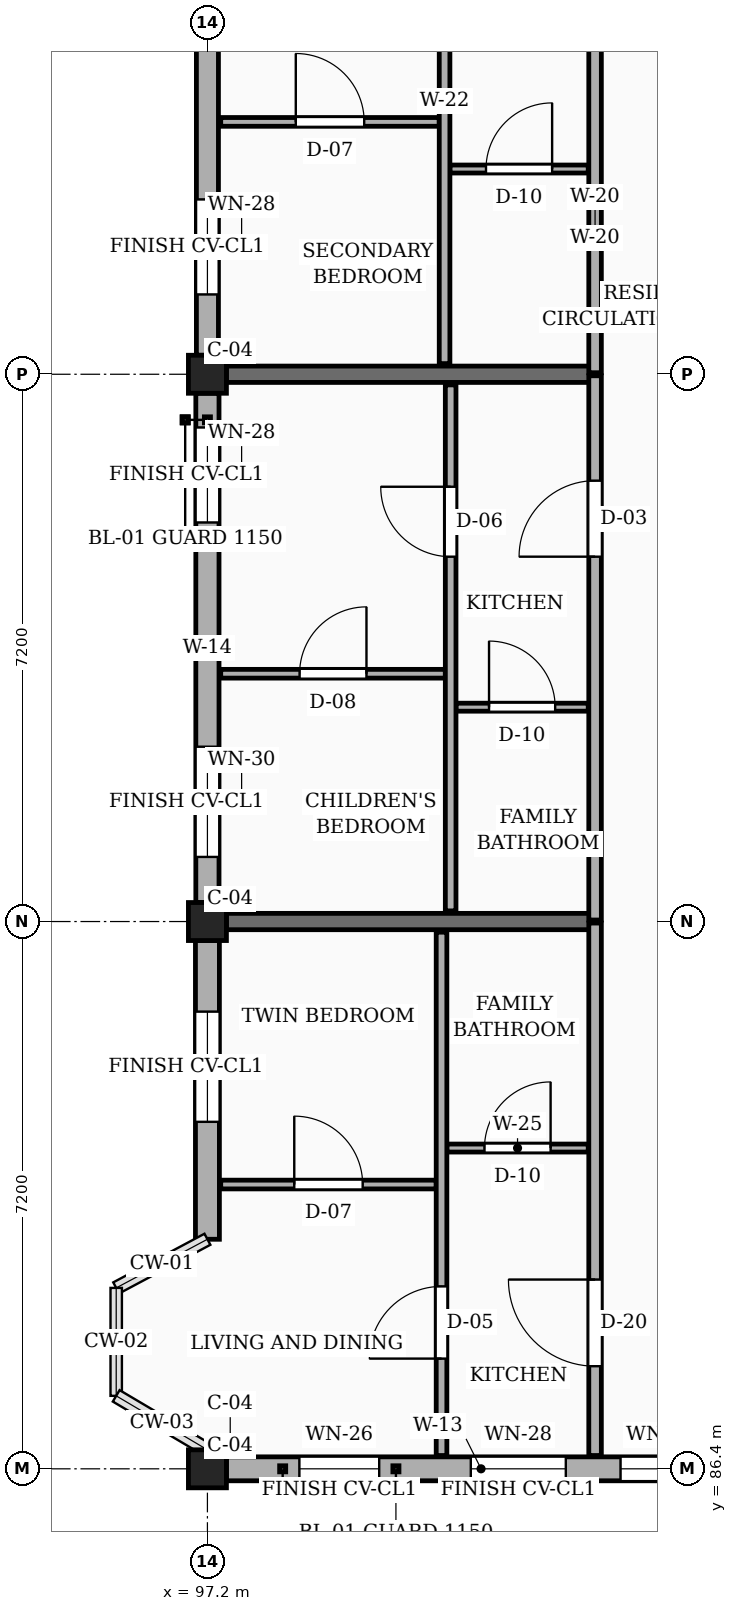
"""IFC4 building model, lengths in metres.
Left out: names, types, materials, properties, quantities, classifications, styles, units other than length and angle.
Written with IfcOpenShell. Run it as: python <this file> out.ifc"""

import sys

from ifc_helpers import new_model, si_unit, direction, frame, frame_2d, origin, origin_2d, place, context, subcontext, project, spatial, rectangle, extrude, element, fill, save


model = new_model("IFC4")
c1 = context("Model", 3, precision=1e-05, world=origin(), true_north=direction((0.0, 1.0)))
c2 = subcontext(c1, "Body", "Model", "MODEL_VIEW")
j1 = project(units=[si_unit("LENGTHUNIT", "METRE"), si_unit("PLANEANGLEUNIT", "RADIAN")], contexts=[c1])
p1 = place(None, origin())
s1 = spatial("IfcSite", under=j1, at=p1, CompositionType="ELEMENT")
p2 = place(p1, origin())
s2 = spatial("IfcBuilding", under=s1, at=p2, CompositionType="ELEMENT")
p3 = place(p2, frame((0.0, 0.0, 26.55)))
s3 = spatial("IfcBuildingStorey", under=s2, at=p3, CompositionType="ELEMENT", Elevation=26.55)
for number, where, z_axis, x_axis in (
    (1, (97.2, 86.4, 0.0), (0.0, 0.0, 1.0), (1.0, 0.0, 0.0)),
    (2, (97.2, 93.6, 0.0), (0.0, 0.0, 1.0), (1.0, 0.0, 0.0)),
    (3, (97.2, 100.8, 0.0), (0.0, 0.0, 1.0), (1.0, 0.0, 0.0)),
):
    element("IfcColumn", number, at=place(p3, frame(where, z_axis=z_axis, x_axis=x_axis)), inside=s3, PredefinedType="COLUMN", context=c2, shape_type="SweptSolid", body=[
        extrude(rectangle(XDim=0.5, YDim=0.5, at=origin_2d()), origin(), (0.0, 0.0, 1.0), 3.15),
    ])
for number, where, z_axis, x_axis in (
    (4, (97.45, 93.6, 0.0), (0.0, 0.0, 1.0), (1.0, 0.0, 0.0)),
    (5, (97.45, 100.8, 0.0), (0.0, 0.0, 1.0), (1.0, 0.0, 0.0)),
):
    element("IfcWall", number, at=place(p3, frame(where, z_axis=z_axis, x_axis=x_axis)), inside=s3, PredefinedType="SOLIDWALL", context=c2, shape_type="SweptSolid", body=[
        extrude(rectangle(XDim=4.85, YDim=0.215, at=frame_2d((2.425, 0.0))), origin(), (0.0, 0.0, 1.0), 2.19),
    ])
p4 = place(p3, frame((97.45, 86.4, 0.0), z_axis=(0.0, 0.0, 1.0), x_axis=(1.0, 0.0, 0.0)))
e6 = element("IfcWall", 6, at=p4, inside=s3, PredefinedType="SOLIDWALL", context=c2, shape_type="SweptSolid", body=[
    extrude(rectangle(XDim=6.7, YDim=0.315, at=frame_2d((3.35, 0.0))), origin(), (0.0, 0.0, 1.0), 2.46),
])
p5 = place(p4, frame((0.96, 0.0, 0.78)))
e7 = element("IfcOpeningElement", 7, at=p5, cuts=e6, PredefinedType="OPENING", context=c2, shape_type="SweptSolid", body=[
    extrude(rectangle(XDim=1.05, YDim=1.44, at=frame_2d((0.525, 0.72))), frame((0.0, 0.167, 0.0), z_axis=(0.0, -1.0, 0.0), x_axis=(1.0, 0.0, 0.0)), (0.0, 0.0, 1.0), 0.335),
])
p6 = place(p4, frame((3.215, 0.0, 0.78)))
e8 = element("IfcOpeningElement", 8, at=p6, cuts=e6, PredefinedType="OPENING", context=c2, shape_type="SweptSolid", body=[
    extrude(rectangle(XDim=1.25, YDim=1.44, at=frame_2d((0.625, 0.72))), frame((0.0, 0.167, 0.0), z_axis=(0.0, -1.0, 0.0), x_axis=(1.0, 0.0, 0.0)), (0.0, 0.0, 1.0), 0.335),
])
p7 = place(p4, frame((5.185, 0.0, 0.78)))
e9 = element("IfcOpeningElement", 9, at=p7, cuts=e6, PredefinedType="OPENING", context=c2, shape_type="SweptSolid", body=[
    extrude(rectangle(XDim=1.04, YDim=1.26, at=frame_2d((0.52, 0.63))), frame((0.0, 0.167, 0.0), z_axis=(0.0, -1.0, 0.0), x_axis=(1.0, 0.0, 0.0)), (0.0, 0.0, 1.0), 0.335),
])
p8 = place(p3, frame((97.2, 107.75, 0.0), z_axis=(0.0, 0.0, 1.0), x_axis=(0.0, -1.0, 0.0)))
e10 = element("IfcWall", 10, at=p8, inside=s3, PredefinedType="SOLIDWALL", context=c2, shape_type="SweptSolid", body=[
    extrude(rectangle(XDim=6.7, YDim=0.29, at=frame_2d((3.35, 0.0))), origin(), (0.0, 0.0, 1.0), 2.46),
])
p9 = place(p8, frame((0.45, 0.0, 0.78)))
e11 = element("IfcOpeningElement", 11, at=p9, cuts=e10, PredefinedType="OPENING", context=c2, shape_type="SweptSolid", body=[
    extrude(rectangle(XDim=1.05, YDim=1.44, at=frame_2d((0.525, 0.72))), frame((0.0, 0.155, 0.0), z_axis=(0.0, -1.0, 0.0), x_axis=(1.0, 0.0, 0.0)), (0.0, 0.0, 1.0), 0.31),
])
p10 = place(p8, frame((4.65, 0.0, 0.78)))
e12 = element("IfcOpeningElement", 12, at=p10, cuts=e10, PredefinedType="OPENING", context=c2, shape_type="SweptSolid", body=[
    extrude(rectangle(XDim=1.25, YDim=1.44, at=frame_2d((0.625, 0.72))), frame((0.0, 0.155, 0.0), z_axis=(0.0, -1.0, 0.0), x_axis=(1.0, 0.0, 0.0)), (0.0, 0.0, 1.0), 0.31),
])
p11 = place(p3, frame((97.2, 100.55, 0.0), z_axis=(0.0, 0.0, 1.0), x_axis=(0.0, -1.0, 0.0)))
e13 = element("IfcWall", 13, at=p11, inside=s3, PredefinedType="SOLIDWALL", context=c2, shape_type="SweptSolid", body=[
    extrude(rectangle(XDim=6.7, YDim=0.305, at=frame_2d((3.35, 0.0))), origin(), (0.0, 0.0, 1.0), 2.46),
])
p12 = place(p11, frame((0.45, 0.0, 0.78)))
e14 = element("IfcOpeningElement", 14, at=p12, cuts=e13, PredefinedType="OPENING", context=c2, shape_type="SweptSolid", body=[
    extrude(rectangle(XDim=1.25, YDim=1.44, at=frame_2d((0.625, 0.72))), frame((0.0, 0.163, 0.0), z_axis=(0.0, -1.0, 0.0), x_axis=(1.0, 0.0, 0.0)), (0.0, 0.0, 1.0), 0.325),
])
p13 = place(p11, frame((4.65, 0.0, 0.78)))
e15 = element("IfcOpeningElement", 15, at=p13, cuts=e13, PredefinedType="OPENING", context=c2, shape_type="SweptSolid", body=[
    extrude(rectangle(XDim=1.45, YDim=1.44, at=frame_2d((0.725, 0.72))), frame((0.0, 0.163, 0.0), z_axis=(0.0, -1.0, 0.0), x_axis=(1.0, 0.0, 0.0)), (0.0, 0.0, 1.0), 0.325),
])
p14 = place(p3, frame((97.2, 93.35, 0.0), z_axis=(0.0, 0.0, 1.0), x_axis=(0.0, -1.0, 0.0)))
e16 = element("IfcWall", 16, at=p14, inside=s3, PredefinedType="SOLIDWALL", context=c2, shape_type="SweptSolid", body=[
    extrude(rectangle(XDim=3.93, YDim=0.315, at=frame_2d((1.965, 0.0))), origin(), (0.0, 0.0, 1.0), 2.46),
])
p15 = place(p14, frame((0.935, 0.0, 0.78)))
e17 = element("IfcOpeningElement", 17, at=p15, cuts=e16, PredefinedType="OPENING", context=c2, shape_type="SweptSolid", body=[
    extrude(rectangle(XDim=1.45, YDim=1.44, at=frame_2d((0.725, 0.72))), frame((0.0, 0.167, 0.0), z_axis=(0.0, -1.0, 0.0), x_axis=(1.0, 0.0, 0.0)), (0.0, 0.0, 1.0), 0.335),
])
p16 = place(p3, frame((102.3, 86.575, 0.0), z_axis=(0.0, 0.0, 1.0), x_axis=(0.0, 1.0, 0.0)))
e18 = element("IfcWall", 18, at=p16, inside=s3, PredefinedType="PARTITIONING", context=c2, shape_type="SweptSolid", body=[
    extrude(rectangle(XDim=7.005, YDim=0.165, at=frame_2d((3.502, 0.0))), origin(), (0.0, 0.0, 1.0), 2.325),
])
p17 = place(p16, frame((1.175, 0.0, 0.0)))
e19 = element("IfcOpeningElement", 19, at=p17, cuts=e18, PredefinedType="OPENING", context=c2, shape_type="SweptSolid", body=[
    extrude(rectangle(XDim=1.14, YDim=2.18, at=frame_2d((0.57, 1.09))), frame((0.0, 0.093, 0.0), z_axis=(0.0, -1.0, 0.0), x_axis=(1.0, 0.0, 0.0)), (0.0, 0.0, 1.0), 0.185),
])
p18 = place(p3, frame((102.3, 93.62, 0.0), z_axis=(0.0, 0.0, 1.0), x_axis=(0.0, 1.0, 0.0)))
e20 = element("IfcWall", 20, at=p18, inside=s3, PredefinedType="PARTITIONING", context=c2, shape_type="SweptSolid", body=[
    extrude(rectangle(XDim=7.16, YDim=0.165, at=frame_2d((3.58, 0.0))), origin(), (0.0, 0.0, 1.0), 2.325),
])
p19 = place(p18, frame((4.78, 0.0, 0.0)))
e21 = element("IfcOpeningElement", 21, at=p19, cuts=e20, PredefinedType="OPENING", context=c2, shape_type="SweptSolid", body=[
    extrude(rectangle(XDim=1.0, YDim=2.15, at=frame_2d((0.5, 1.075))), frame((0.0, 0.093, 0.0), z_axis=(0.0, -1.0, 0.0), x_axis=(1.0, 0.0, 0.0)), (0.0, 0.0, 1.0), 0.185),
])
p20 = place(p3, frame((102.3, 100.82, 0.0), z_axis=(0.0, 0.0, 1.0), x_axis=(0.0, 1.0, 0.0)))
e22 = element("IfcWall", 22, at=p20, inside=s3, PredefinedType="PARTITIONING", context=c2, shape_type="SweptSolid", body=[
    extrude(rectangle(XDim=7.16, YDim=0.165, at=frame_2d((3.58, 0.0))), origin(), (0.0, 0.0, 1.0), 2.325),
])
p21 = place(p20, frame((4.78, 0.0, 0.0)))
e23 = element("IfcOpeningElement", 23, at=p21, cuts=e22, PredefinedType="OPENING", context=c2, shape_type="SweptSolid", body=[
    extrude(rectangle(XDim=0.94, YDim=2.12, at=frame_2d((0.47, 1.06))), frame((0.0, 0.093, 0.0), z_axis=(0.0, -1.0, 0.0), x_axis=(1.0, 0.0, 0.0)), (0.0, 0.0, 1.0), 0.185),
])
p22 = place(p3, frame((97.375, 90.14, 0.0), z_axis=(0.0, 0.0, 1.0), x_axis=(1.0, 0.0, 0.0)))
e24 = element("IfcWall", 24, at=p22, inside=s3, PredefinedType="PARTITIONING", context=c2, shape_type="SweptSolid", body=[
    extrude(rectangle(XDim=2.835, YDim=0.115, at=frame_2d((1.417, 0.0))), origin(), (0.0, 0.0, 1.0), 2.325),
])
p23 = place(p22, frame((0.968, 0.0, 0.0)))
e25 = element("IfcOpeningElement", 25, at=p23, cuts=e24, PredefinedType="OPENING", context=c2, shape_type="SweptSolid", body=[
    extrude(rectangle(XDim=0.9, YDim=2.1, at=frame_2d((0.45, 1.05))), frame((0.0, 0.067, 0.0), z_axis=(0.0, -1.0, 0.0), x_axis=(1.0, 0.0, 0.0)), (0.0, 0.0, 1.0), 0.135),
])
p24 = place(p3, frame((100.35, 90.62, 0.0), z_axis=(0.0, 0.0, 1.0), x_axis=(1.0, 0.0, 0.0)))
e26 = element("IfcWall", 26, at=p24, inside=s3, PredefinedType="PARTITIONING", context=c2, shape_type="SweptSolid", body=[
    extrude(rectangle(XDim=1.86, YDim=0.105, at=frame_2d((0.93, 0.0))), origin(), (0.0, 0.0, 1.0), 2.325),
])
p25 = place(p24, frame((0.495, 0.0, 0.0)))
e27 = element("IfcOpeningElement", 27, at=p25, cuts=e26, PredefinedType="OPENING", context=c2, shape_type="SweptSolid", body=[
    extrude(rectangle(XDim=0.87, YDim=2.05, at=frame_2d((0.435, 1.025))), frame((0.0, 0.062, 0.0), z_axis=(0.0, -1.0, 0.0), x_axis=(1.0, 0.0, 0.0)), (0.0, 0.0, 1.0), 0.125),
])
p26 = place(p3, frame((100.28, 86.575, 0.0), z_axis=(0.0, 0.0, 1.0), x_axis=(0.0, 1.0, 0.0)))
e28 = element("IfcWall", 28, at=p26, inside=s3, PredefinedType="PARTITIONING", context=c2, shape_type="SweptSolid", body=[
    extrude(rectangle(XDim=6.885, YDim=0.14, at=frame_2d((3.442, 0.0))), origin(), (0.0, 0.0, 1.0), 2.325),
])
p27 = place(p26, frame((1.275, 0.0, 0.0)))
e29 = element("IfcOpeningElement", 29, at=p27, cuts=e28, PredefinedType="OPENING", context=c2, shape_type="SweptSolid", body=[
    extrude(rectangle(XDim=0.95, YDim=2.1, at=frame_2d((0.475, 1.05))), frame((0.0, 0.08, 0.0), z_axis=(0.0, -1.0, 0.0), x_axis=(1.0, 0.0, 0.0)), (0.0, 0.0, 1.0), 0.16),
])
p28 = place(p3, frame((97.375, 96.86, 0.0), z_axis=(0.0, 0.0, 1.0), x_axis=(1.0, 0.0, 0.0)))
e30 = element("IfcWall", 30, at=p28, inside=s3, PredefinedType="PARTITIONING", context=c2, shape_type="SweptSolid", body=[
    extrude(rectangle(XDim=2.955, YDim=0.115, at=frame_2d((1.478, 0.0))), origin(), (0.0, 0.0, 1.0), 2.325),
])
p29 = place(p28, frame((1.038, 0.0, 0.0)))
e31 = element("IfcOpeningElement", 31, at=p29, cuts=e30, PredefinedType="OPENING", context=c2, shape_type="SweptSolid", body=[
    extrude(rectangle(XDim=0.88, YDim=2.08, at=frame_2d((0.44, 1.04))), frame((0.0, 0.067, 0.0), z_axis=(0.0, -1.0, 0.0), x_axis=(1.0, 0.0, 0.0)), (0.0, 0.0, 1.0), 0.135),
])
p30 = place(p3, frame((100.47, 96.42, 0.0), z_axis=(0.0, 0.0, 1.0), x_axis=(1.0, 0.0, 0.0)))
e32 = element("IfcWall", 32, at=p30, inside=s3, PredefinedType="PARTITIONING", context=c2, shape_type="SweptSolid", body=[
    extrude(rectangle(XDim=1.74, YDim=0.105, at=frame_2d((0.87, 0.0))), origin(), (0.0, 0.0, 1.0), 2.325),
])
p31 = place(p30, frame((0.435, 0.0, 0.0)))
e33 = element("IfcOpeningElement", 33, at=p31, cuts=e32, PredefinedType="OPENING", context=c2, shape_type="SweptSolid", body=[
    extrude(rectangle(XDim=0.87, YDim=2.05, at=frame_2d((0.435, 1.025))), frame((0.0, 0.062, 0.0), z_axis=(0.0, -1.0, 0.0), x_axis=(1.0, 0.0, 0.0)), (0.0, 0.0, 1.0), 0.125),
])
p32 = place(p3, frame((100.4, 93.74, 0.0), z_axis=(0.0, 0.0, 1.0), x_axis=(0.0, 1.0, 0.0)))
e34 = element("IfcWall", 34, at=p32, inside=s3, PredefinedType="PARTITIONING", context=c2, shape_type="SweptSolid", body=[
    extrude(rectangle(XDim=6.92, YDim=0.14, at=frame_2d((3.46, 0.0))), origin(), (0.0, 0.0, 1.0), 2.325),
])
p33 = place(p32, frame((4.66, 0.0, 0.0)))
e35 = element("IfcOpeningElement", 35, at=p33, cuts=e34, PredefinedType="OPENING", context=c2, shape_type="SweptSolid", body=[
    extrude(rectangle(XDim=0.92, YDim=2.1, at=frame_2d((0.46, 1.05))), frame((0.0, 0.08, 0.0), z_axis=(0.0, -1.0, 0.0), x_axis=(1.0, 0.0, 0.0)), (0.0, 0.0, 1.0), 0.16),
])
p34 = place(p3, frame((97.375, 104.12, 0.0), z_axis=(0.0, 0.0, 1.0), x_axis=(1.0, 0.0, 0.0)))
e36 = element("IfcWall", 36, at=p34, inside=s3, PredefinedType="PARTITIONING", context=c2, shape_type="SweptSolid", body=[
    extrude(rectangle(XDim=2.875, YDim=0.115, at=frame_2d((1.438, 0.0))), origin(), (0.0, 0.0, 1.0), 2.325),
])
p35 = place(p34, frame((0.988, 0.0, 0.0)))
e37 = element("IfcOpeningElement", 37, at=p35, cuts=e36, PredefinedType="OPENING", context=c2, shape_type="SweptSolid", body=[
    extrude(rectangle(XDim=0.9, YDim=2.1, at=frame_2d((0.45, 1.05))), frame((0.0, 0.067, 0.0), z_axis=(0.0, -1.0, 0.0), x_axis=(1.0, 0.0, 0.0)), (0.0, 0.0, 1.0), 0.135),
])
p36 = place(p3, frame((100.39, 103.5, 0.0), z_axis=(0.0, 0.0, 1.0), x_axis=(1.0, 0.0, 0.0)))
e38 = element("IfcWall", 38, at=p36, inside=s3, PredefinedType="PARTITIONING", context=c2, shape_type="SweptSolid", body=[
    extrude(rectangle(XDim=1.82, YDim=0.105, at=frame_2d((0.91, 0.0))), origin(), (0.0, 0.0, 1.0), 2.325),
])
p37 = place(p36, frame((0.475, 0.0, 0.0)))
e39 = element("IfcOpeningElement", 39, at=p37, cuts=e38, PredefinedType="OPENING", context=c2, shape_type="SweptSolid", body=[
    extrude(rectangle(XDim=0.87, YDim=2.05, at=frame_2d((0.435, 1.025))), frame((0.0, 0.062, 0.0), z_axis=(0.0, -1.0, 0.0), x_axis=(1.0, 0.0, 0.0)), (0.0, 0.0, 1.0), 0.125),
])
p38 = place(p3, frame((100.32, 100.94, 0.0), z_axis=(0.0, 0.0, 1.0), x_axis=(0.0, 1.0, 0.0)))
e40 = element("IfcWall", 40, at=p38, inside=s3, PredefinedType="PARTITIONING", context=c2, shape_type="SweptSolid", body=[
    extrude(rectangle(XDim=6.92, YDim=0.14, at=frame_2d((3.46, 0.0))), origin(), (0.0, 0.0, 1.0), 2.325),
])
p39 = place(p38, frame((4.66, 0.0, 0.0)))
e41 = element("IfcOpeningElement", 41, at=p39, cuts=e40, PredefinedType="OPENING", context=c2, shape_type="SweptSolid", body=[
    extrude(rectangle(XDim=0.95, YDim=2.1, at=frame_2d((0.475, 1.05))), frame((0.0, 0.08, 0.0), z_axis=(0.0, -1.0, 0.0), x_axis=(1.0, 0.0, 0.0)), (0.0, 0.0, 1.0), 0.16),
])
p40 = place(p5, origin())
e42 = element("IfcWindow", 42, at=p40, inside=s3, PartitioningType="SINGLE_PANEL", PredefinedType="WINDOW", context=c2, shape_type="SweptSolid", body=[
    extrude(rectangle(XDim=1.05, YDim=1.44, at=frame_2d((0.525, 0.72))), frame((0.0, 0.03, 0.0), z_axis=(0.0, -1.0, 0.0), x_axis=(1.0, 0.0, 0.0)), (0.0, 0.0, 1.0), 0.06),
])
fill(e7, e42)
p41 = place(p6, origin())
e43 = element("IfcWindow", 43, at=p41, inside=s3, PartitioningType="SINGLE_PANEL", PredefinedType="WINDOW", context=c2, shape_type="SweptSolid", body=[
    extrude(rectangle(XDim=1.25, YDim=1.44, at=frame_2d((0.625, 0.72))), frame((0.0, 0.03, 0.0), z_axis=(0.0, -1.0, 0.0), x_axis=(1.0, 0.0, 0.0)), (0.0, 0.0, 1.0), 0.06),
])
fill(e8, e43)
p42 = place(p7, origin())
e44 = element("IfcWindow", 44, at=p42, inside=s3, PartitioningType="SINGLE_PANEL", PredefinedType="WINDOW", context=c2, shape_type="SweptSolid", body=[
    extrude(rectangle(XDim=1.04, YDim=1.26, at=frame_2d((0.52, 0.63))), frame((0.0, 0.03, 0.0), z_axis=(0.0, -1.0, 0.0), x_axis=(1.0, 0.0, 0.0)), (0.0, 0.0, 1.0), 0.06),
])
fill(e9, e44)
p43 = place(p10, origin())
e45 = element("IfcWindow", 45, at=p43, inside=s3, PartitioningType="SINGLE_PANEL", PredefinedType="WINDOW", context=c2, shape_type="SweptSolid", body=[
    extrude(rectangle(XDim=1.25, YDim=1.44, at=frame_2d((0.625, 0.72))), frame((0.0, 0.03, 0.0), z_axis=(0.0, -1.0, 0.0), x_axis=(1.0, 0.0, 0.0)), (0.0, 0.0, 1.0), 0.06),
])
fill(e12, e45)
p44 = place(p12, origin())
e46 = element("IfcWindow", 46, at=p44, inside=s3, PartitioningType="SINGLE_PANEL", PredefinedType="WINDOW", context=c2, shape_type="SweptSolid", body=[
    extrude(rectangle(XDim=1.25, YDim=1.44, at=frame_2d((0.625, 0.72))), frame((0.0, 0.03, 0.0), z_axis=(0.0, -1.0, 0.0), x_axis=(1.0, 0.0, 0.0)), (0.0, 0.0, 1.0), 0.06),
])
fill(e14, e46)
p45 = place(p13, origin())
e47 = element("IfcWindow", 47, at=p45, inside=s3, PartitioningType="SINGLE_PANEL", PredefinedType="WINDOW", context=c2, shape_type="SweptSolid", body=[
    extrude(rectangle(XDim=1.45, YDim=1.44, at=frame_2d((0.725, 0.72))), frame((0.0, 0.03, 0.0), z_axis=(0.0, -1.0, 0.0), x_axis=(1.0, 0.0, 0.0)), (0.0, 0.0, 1.0), 0.06),
])
fill(e15, e47)
p46 = place(p15, origin())
e48 = element("IfcWindow", 48, at=p46, inside=s3, PartitioningType="SINGLE_PANEL", PredefinedType="WINDOW", context=c2, shape_type="SweptSolid", body=[
    extrude(rectangle(XDim=1.45, YDim=1.44, at=frame_2d((0.725, 0.72))), frame((0.0, 0.03, 0.0), z_axis=(0.0, -1.0, 0.0), x_axis=(1.0, 0.0, 0.0)), (0.0, 0.0, 1.0), 0.06),
])
fill(e17, e48)
p47 = place(p17, origin())
e49 = element("IfcDoor", 49, at=p47, inside=s3, OperationType="SINGLE_SWING_RIGHT", PredefinedType="DOOR", context=c2, shape_type="SweptSolid", body=[
    extrude(rectangle(XDim=1.14, YDim=2.18, at=frame_2d((0.57, 1.09))), frame((0.0, 0.025, 0.0), z_axis=(0.0, -1.0, 0.0), x_axis=(1.0, 0.0, 0.0)), (0.0, 0.0, 1.0), 0.05),
])
fill(e19, e49)
p48 = place(p19, origin())
e50 = element("IfcDoor", 50, at=p48, inside=s3, OperationType="SINGLE_SWING_LEFT", PredefinedType="DOOR", context=c2, shape_type="SweptSolid", body=[
    extrude(rectangle(XDim=1.0, YDim=2.15, at=frame_2d((0.5, 1.075))), frame((0.0, 0.025, 0.0), z_axis=(0.0, -1.0, 0.0), x_axis=(1.0, 0.0, 0.0)), (0.0, 0.0, 1.0), 0.05),
])
fill(e21, e50)
p49 = place(p23, origin())
e51 = element("IfcDoor", 51, at=p49, inside=s3, OperationType="SINGLE_SWING_LEFT", PredefinedType="DOOR", context=c2, shape_type="SweptSolid", body=[
    extrude(rectangle(XDim=0.9, YDim=2.1, at=frame_2d((0.45, 1.05))), frame((0.0, 0.025, 0.0), z_axis=(0.0, -1.0, 0.0), x_axis=(1.0, 0.0, 0.0)), (0.0, 0.0, 1.0), 0.05),
])
fill(e25, e51)
p50 = place(p25, origin())
e52 = element("IfcDoor", 52, at=p50, inside=s3, OperationType="SINGLE_SWING_RIGHT", PredefinedType="DOOR", context=c2, shape_type="SweptSolid", body=[
    extrude(rectangle(XDim=0.87, YDim=2.05, at=frame_2d((0.435, 1.025))), frame((0.0, 0.025, 0.0), z_axis=(0.0, -1.0, 0.0), x_axis=(1.0, 0.0, 0.0)), (0.0, 0.0, 1.0), 0.05),
])
fill(e27, e52)
p51 = place(p27, origin())
e53 = element("IfcDoor", 53, at=p51, inside=s3, OperationType="SINGLE_SWING_LEFT", PredefinedType="DOOR", context=c2, shape_type="SweptSolid", body=[
    extrude(rectangle(XDim=0.95, YDim=2.1, at=frame_2d((0.475, 1.05))), frame((0.0, 0.025, 0.0), z_axis=(0.0, -1.0, 0.0), x_axis=(1.0, 0.0, 0.0)), (0.0, 0.0, 1.0), 0.05),
])
fill(e29, e53)
p52 = place(p29, origin())
e54 = element("IfcDoor", 54, at=p52, inside=s3, OperationType="SINGLE_SWING_RIGHT", PredefinedType="DOOR", context=c2, shape_type="SweptSolid", body=[
    extrude(rectangle(XDim=0.88, YDim=2.08, at=frame_2d((0.44, 1.04))), frame((0.0, 0.025, 0.0), z_axis=(0.0, -1.0, 0.0), x_axis=(1.0, 0.0, 0.0)), (0.0, 0.0, 1.0), 0.05),
])
fill(e31, e54)
p53 = place(p31, origin())
e55 = element("IfcDoor", 55, at=p53, inside=s3, OperationType="SINGLE_SWING_LEFT", PredefinedType="DOOR", context=c2, shape_type="SweptSolid", body=[
    extrude(rectangle(XDim=0.87, YDim=2.05, at=frame_2d((0.435, 1.025))), frame((0.0, 0.025, 0.0), z_axis=(0.0, -1.0, 0.0), x_axis=(1.0, 0.0, 0.0)), (0.0, 0.0, 1.0), 0.05),
])
fill(e33, e55)
p54 = place(p33, origin())
e56 = element("IfcDoor", 56, at=p54, inside=s3, OperationType="SINGLE_SWING_RIGHT", PredefinedType="DOOR", context=c2, shape_type="SweptSolid", body=[
    extrude(rectangle(XDim=0.92, YDim=2.1, at=frame_2d((0.46, 1.05))), frame((0.0, 0.025, 0.0), z_axis=(0.0, -1.0, 0.0), x_axis=(1.0, 0.0, 0.0)), (0.0, 0.0, 1.0), 0.05),
])
fill(e35, e56)
p55 = place(p35, origin())
e57 = element("IfcDoor", 57, at=p55, inside=s3, OperationType="SINGLE_SWING_LEFT", PredefinedType="DOOR", context=c2, shape_type="SweptSolid", body=[
    extrude(rectangle(XDim=0.9, YDim=2.1, at=frame_2d((0.45, 1.05))), frame((0.0, 0.025, 0.0), z_axis=(0.0, -1.0, 0.0), x_axis=(1.0, 0.0, 0.0)), (0.0, 0.0, 1.0), 0.05),
])
fill(e37, e57)
p56 = place(p37, origin())
e58 = element("IfcDoor", 58, at=p56, inside=s3, OperationType="SINGLE_SWING_RIGHT", PredefinedType="DOOR", context=c2, shape_type="SweptSolid", body=[
    extrude(rectangle(XDim=0.87, YDim=2.05, at=frame_2d((0.435, 1.025))), frame((0.0, 0.025, 0.0), z_axis=(0.0, -1.0, 0.0), x_axis=(1.0, 0.0, 0.0)), (0.0, 0.0, 1.0), 0.05),
])
fill(e39, e58)
save(model, sys.argv[1])
